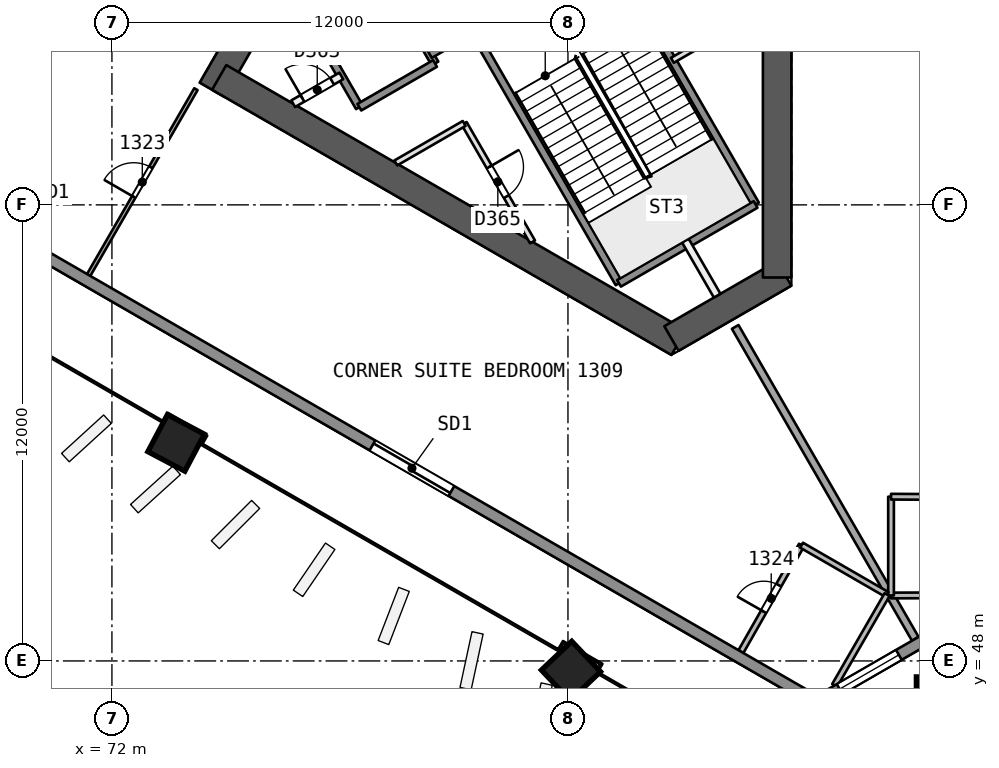
"""IFC4 building model, lengths in metres.
Left out: names, types, materials, properties, quantities, classifications, styles, units other than length and angle.
Written with IfcOpenShell. Run it as: python <this file> out.ifc"""

import sys

from ifc_helpers import new_model, si_unit, direction, frame, frame_2d, origin, origin_2d, place, context, subcontext, project, spatial, rectangle, extrude, element, fill, save


model = new_model("IFC4")
c1 = context("Model", 3, precision=1e-05, world=origin(), true_north=direction((0.0, 1.0)))
c2 = subcontext(c1, "Body", "Model", "MODEL_VIEW")
j1 = project(units=[si_unit("LENGTHUNIT", "METRE"), si_unit("PLANEANGLEUNIT", "RADIAN")], contexts=[c1])
p1 = place(None, origin())
s1 = spatial("IfcSite", under=j1, at=p1, CompositionType="ELEMENT")
p2 = place(p1, origin())
s2 = spatial("IfcBuilding", under=s1, at=p2, CompositionType="ELEMENT")
p3 = place(p2, frame((0.0, 0.0, 61.0)))
s3 = spatial("IfcBuildingStorey", under=s2, at=p3, CompositionType="ELEMENT", Elevation=61.0)
p4 = place(p3, frame((79.717, 71.831, 0.0), z_axis=(0.0, 0.0, 1.0), x_axis=(-0.499996230114, -0.866027580318, 0.0)))
e1 = element("IfcWall", 1, at=p4, inside=s3, PredefinedType="SHEAR", context=c2, shape_type="SweptSolid", body=[
    extrude(rectangle(XDim=10.164, YDim=0.75, at=frame_2d((5.082, 0.0))), origin(), (0.0, 0.0, 1.0), 3.7),
])
p5 = place(p4, frame((0.733, 0.0, 0.0)))
e2 = element("IfcOpeningElement", 2, at=p5, cuts=e1, PredefinedType="OPENING", context=c2, shape_type="SweptSolid", body=[
    extrude(rectangle(XDim=1.2, YDim=2.1, at=frame_2d((0.6, 1.05))), frame((0.0, 0.385, 0.0), z_axis=(0.0, -1.0, 0.0), x_axis=(1.0, 0.0, 0.0)), (0.0, 0.0, 1.0), 0.771),
])
p6 = place(p3, frame((74.822, 63.354, 0.0), z_axis=(0.0, 0.0, 1.0), x_axis=(0.8660248072, -0.500001033313, 0.0)))
e3 = element("IfcWall", 3, at=p6, inside=s3, PredefinedType="SHEAR", context=c2, shape_type="SweptSolid", body=[
    extrude(rectangle(XDim=13.958, YDim=0.75, at=frame_2d((6.979, 0.0))), origin(), (0.0, 0.0, 1.0), 3.7),
])
p7 = place(p3, frame((86.723, 56.483, 0.0), z_axis=(0.0, 0.0, 1.0), x_axis=(0.866017201164, 0.500014207086, 0.0)))
e4 = element("IfcWall", 4, at=p7, inside=s3, PredefinedType="SHEAR", context=c2, shape_type="SweptSolid", body=[
    extrude(rectangle(XDim=3.429, YDim=0.75, at=frame_2d((1.714, 0.0))), origin(), (0.0, 0.0, 1.0), 3.7),
])
p8 = place(p3, frame((89.505, 58.089, 0.0), z_axis=(0.0, 0.0, 1.0), x_axis=(0.0, 1.0, 0.0)))
e5 = element("IfcWall", 5, at=p8, inside=s3, PredefinedType="SHEAR", context=c2, shape_type="SweptSolid", body=[
    extrude(rectangle(XDim=14.117, YDim=0.75, at=frame_2d((7.059, 0.0))), origin(), (0.0, 0.0, 1.0), 3.7),
])
p9 = place(p3, frame((73.688, 53.709, 0.0), z_axis=(0.000857580205, 0.022758859284, 0.9997406158), x_axis=(-0.500033163106, -0.865772080668, 0.020138026985)))
e6 = element("IfcColumn", 6, at=p9, inside=s3, PredefinedType="COLUMN", context=c2, shape_type="SweptSolid", body=[
    extrude(rectangle(XDim=1.1, YDim=1.1, at=origin_2d()), origin(), (0.0, 0.0, 1.0), 3.701),
])
p10 = place(p3, frame((84.089, 47.705, 0.0), z_axis=(-0.008376454378, 0.028163354484, 0.999568237028), x_axis=(-0.500229782748, -0.865657085713, 0.020198376324)))
e7 = element("IfcColumn", 7, at=p10, inside=s3, PredefinedType="COLUMN", context=c2, shape_type="SweptSolid", body=[
    extrude(rectangle(XDim=1.1, YDim=1.1, at=origin_2d()), origin(), (0.0, 0.0, 1.0), 3.702),
])
p11 = place(p3, frame((94.49, 46.243, 0.0), z_axis=(-0.017607037296, 0.030466109479, 0.999380712447), x_axis=(0.500061328599, -0.865274797998, 0.035187946645)))
e8 = element("IfcColumn", 8, at=p11, inside=s3, PredefinedType="COLUMN", context=c2, shape_type="SweptSolid", body=[
    extrude(rectangle(XDim=2.6, YDim=2.6, at=origin_2d()), origin(), (0.0, 0.0, 1.0), 3.702),
])
p12 = place(p3, frame((95.131, 49.73, 0.0), z_axis=(0.0, 0.0, 1.0), x_axis=(-0.999994721507, -0.00324914735, 0.0)))
e9 = element("IfcWall", 9, at=p12, inside=s3, PredefinedType="PARTITIONING", context=c2, shape_type="SweptSolid", body=[
    extrude(rectangle(XDim=2.63, YDim=0.15, at=frame_2d((1.315, 0.0))), origin(), (0.0, 0.0, 1.0), 3.2),
])
p13 = place(p3, frame((92.501, 49.722, 0.0), z_axis=(0.0, 0.0, 1.0), x_axis=(0.0, 1.0, 0.0)))
e10 = element("IfcWall", 10, at=p13, inside=s3, PredefinedType="PARTITIONING", context=c2, shape_type="SweptSolid", body=[
    extrude(rectangle(XDim=2.6, YDim=0.15, at=frame_2d((1.3, 0.0))), origin(), (0.0, 0.0, 1.0), 3.2),
])
p14 = place(p3, frame((92.501, 52.322, 0.0), z_axis=(0.0, 0.0, 1.0), x_axis=(0.999982552355, -0.005907197749, 0.0)))
e11 = element("IfcWall", 11, at=p14, inside=s3, PredefinedType="PARTITIONING", context=c2, shape_type="SweptSolid", body=[
    extrude(rectangle(XDim=3.224, YDim=0.15, at=frame_2d((1.612, 0.0))), origin(), (0.0, 0.0, 1.0), 3.2),
])
p15 = place(p14, frame((1.212, 0.0, 0.0)))
e12 = element("IfcOpeningElement", 12, at=p15, cuts=e11, PredefinedType="OPENING", context=c2, shape_type="SweptSolid", body=[
    extrude(rectangle(XDim=0.8, YDim=2.1, at=frame_2d((0.4, 1.05))), frame((0.0, 0.085, 0.0), z_axis=(0.0, -1.0, 0.0), x_axis=(1.0, 0.0, 0.0)), (0.0, 0.0, 1.0), 0.171),
])
p16 = place(p3, frame((88.401, 56.789, 0.0), z_axis=(0.0, 0.0, 1.0), x_axis=(0.499990030109, -0.866031159827, 0.0)))
e13 = element("IfcWall", 13, at=p16, inside=s3, PredefinedType="PARTITIONING", context=c2, shape_type="SweptSolid", body=[
    extrude(rectangle(XDim=9.478, YDim=0.2, at=frame_2d((4.739, 0.0))), origin(), (0.0, 0.0, 1.0), 3.2),
])
p17 = place(p3, frame((67.337, 60.493, 0.0), z_axis=(0.0, 0.0, 1.0), x_axis=(0.49999337185, 0.866029230515, 0.0)))
e14 = element("IfcWall", 14, at=p17, inside=s3, PredefinedType="PARTITIONING", context=c2, shape_type="SweptSolid", body=[
    extrude(rectangle(XDim=13.625, YDim=0.2, at=frame_2d((6.812, 0.0))), origin(), (0.0, 0.0, 1.0), 3.2),
])
p18 = place(p3, frame((71.387, 58.154, 0.0), z_axis=(0.0, 0.0, 1.0), x_axis=(0.499975725007, 0.866039418504, 0.0)))
e15 = element("IfcWall", 15, at=p18, inside=s3, PredefinedType="PARTITIONING", context=c2, shape_type="SweptSolid", body=[
    extrude(rectangle(XDim=5.646, YDim=0.1, at=frame_2d((2.823, 0.0))), origin(), (0.0, 0.0, 1.0), 3.2),
])
p19 = place(p18, frame((2.373, 0.0, 0.0)))
e16 = element("IfcOpeningElement", 16, at=p19, cuts=e15, PredefinedType="OPENING", context=c2, shape_type="SweptSolid", body=[
    extrude(rectangle(XDim=0.9, YDim=2.1, at=frame_2d((0.45, 1.05))), frame((0.0, 0.061, 0.0), z_axis=(0.0, -1.0, 0.0), x_axis=(1.0, 0.0, 0.0)), (0.0, 0.0, 1.0), 0.121),
])
p20 = place(p3, frame((88.551, 48.245, 0.0), z_axis=(0.0, 0.0, 1.0), x_axis=(0.494849738902, 0.868978558947, 0.0)))
e17 = element("IfcWall", 17, at=p20, inside=s3, PredefinedType="PARTITIONING", context=c2, shape_type="SweptSolid", body=[
    extrude(rectangle(XDim=3.224, YDim=0.15, at=frame_2d((1.612, 0.0))), origin(), (0.0, 0.0, 1.0), 3.2),
])
p21 = place(p20, frame((1.212, 0.0, 0.0)))
e18 = element("IfcOpeningElement", 18, at=p21, cuts=e17, PredefinedType="OPENING", context=c2, shape_type="SweptSolid", body=[
    extrude(rectangle(XDim=0.8, YDim=2.1, at=frame_2d((0.4, 1.05))), frame((0.0, 0.085, 0.0), z_axis=(0.0, -1.0, 0.0), x_axis=(1.0, 0.0, 0.0)), (0.0, 0.0, 1.0), 0.171),
])
p22 = place(p3, frame((90.146, 51.046, 0.0), z_axis=(0.0, 0.0, 1.0), x_axis=(0.866021400173, -0.500006934395, 0.0)))
e19 = element("IfcWall", 19, at=p22, inside=s3, PredefinedType="PARTITIONING", context=c2, shape_type="SweptSolid", body=[
    extrude(rectangle(XDim=2.6, YDim=0.15, at=frame_2d((1.3, 0.0))), origin(), (0.0, 0.0, 1.0), 3.2),
])
p23 = place(p3, frame((92.398, 49.746, 0.0), z_axis=(0.0, 0.0, 1.0), x_axis=(-0.50001084716, -0.866019141083, 0.0)))
e20 = element("IfcWall", 20, at=p23, inside=s3, PredefinedType="PARTITIONING", context=c2, shape_type="SweptSolid", body=[
    extrude(rectangle(XDim=2.76, YDim=0.15, at=frame_2d((1.38, 0.0))), origin(), (0.0, 0.0, 1.0), 3.2),
])
p24 = place(p3, frame((95.874, 49.987, 0.0), z_axis=(0.0, 0.0, 1.0), x_axis=(-0.866013487713, -0.500020638674, 0.0)))
e21 = element("IfcWall", 21, at=p24, inside=s3, PredefinedType="SOLIDWALL", context=c2, shape_type="SweptSolid", body=[
    extrude(rectangle(XDim=6.142, YDim=0.3, at=frame_2d((3.071, 0.0))), origin(), (0.0, 0.0, 1.0), 3.2),
])
p25 = place(p24, frame((0.771, 0.0, 0.9)))
e22 = element("IfcOpeningElement", 22, at=p25, cuts=e21, PredefinedType="OPENING", context=c2, shape_type="SweptSolid", body=[
    extrude(rectangle(XDim=1.8, YDim=1.5, at=frame_2d((0.9, 0.75))), frame((0.0, 0.161, 0.0), z_axis=(0.0, -1.0, 0.0), x_axis=(1.0, 0.0, 0.0)), (0.0, 0.0, 1.0), 0.321),
])
p26 = place(p24, frame((3.656, 0.0, 0.9)))
e23 = element("IfcOpeningElement", 23, at=p26, cuts=e21, PredefinedType="OPENING", context=c2, shape_type="SweptSolid", body=[
    extrude(rectangle(XDim=1.8, YDim=1.5, at=frame_2d((0.9, 0.75))), frame((0.0, 0.161, 0.0), z_axis=(0.0, -1.0, 0.0), x_axis=(1.0, 0.0, 0.0)), (0.0, 0.0, 1.0), 0.321),
])
p27 = place(p3, frame((90.555, 46.916, 0.0), z_axis=(0.0, 0.0, 1.0), x_axis=(-0.866024926003, 0.500000827541, 0.0)))
e24 = element("IfcWall", 24, at=p27, inside=s3, PredefinedType="SOLIDWALL", context=c2, shape_type="SweptSolid", body=[
    extrude(rectangle(XDim=60.025, YDim=0.3, at=frame_2d((30.013, 0.0))), origin(), (0.0, 0.0, 1.0), 3.2),
])
p28 = place(p27, frame((28.813, 0.0, 0.0)))
e25 = element("IfcOpeningElement", 25, at=p28, cuts=e24, PredefinedType="OPENING", context=c2, shape_type="SweptSolid", body=[
    extrude(rectangle(XDim=2.4, YDim=2.4, at=frame_2d((1.2, 1.2))), frame((0.0, 0.161, 0.0), z_axis=(0.0, -1.0, 0.0), x_axis=(1.0, 0.0, 0.0)), (0.0, 0.0, 1.0), 0.321),
])
p29 = place(p27, frame((34.269, 0.0, 0.0)))
e26 = element("IfcOpeningElement", 26, at=p29, cuts=e24, PredefinedType="OPENING", context=c2, shape_type="SweptSolid", body=[
    extrude(rectangle(XDim=2.4, YDim=2.4, at=frame_2d((1.2, 1.2))), frame((0.0, 0.161, 0.0), z_axis=(0.0, -1.0, 0.0), x_axis=(1.0, 0.0, 0.0)), (0.0, 0.0, 1.0), 0.321),
])
p30 = place(p27, frame((46.558, 0.0, 0.0)))
e27 = element("IfcOpeningElement", 27, at=p30, cuts=e24, PredefinedType="OPENING", context=c2, shape_type="SweptSolid", body=[
    extrude(rectangle(XDim=2.4, YDim=2.4, at=frame_2d((1.2, 1.2))), frame((0.0, 0.161, 0.0), z_axis=(0.0, -1.0, 0.0), x_axis=(1.0, 0.0, 0.0)), (0.0, 0.0, 1.0), 0.321),
])
p31 = place(p27, frame((23.357, 0.0, 0.0)))
e28 = element("IfcOpeningElement", 28, at=p31, cuts=e24, PredefinedType="OPENING", context=c2, shape_type="SweptSolid", body=[
    extrude(rectangle(XDim=2.4, YDim=2.4, at=frame_2d((1.2, 1.2))), frame((0.0, 0.161, 0.0), z_axis=(0.0, -1.0, 0.0), x_axis=(1.0, 0.0, 0.0)), (0.0, 0.0, 1.0), 0.321),
])
p32 = place(p27, frame((11.109, 0.0, 0.0)))
e29 = element("IfcOpeningElement", 29, at=p32, cuts=e24, PredefinedType="OPENING", context=c2, shape_type="SweptSolid", body=[
    extrude(rectangle(XDim=2.4, YDim=2.4, at=frame_2d((1.2, 1.2))), frame((0.0, 0.161, 0.0), z_axis=(0.0, -1.0, 0.0), x_axis=(1.0, 0.0, 0.0)), (0.0, 0.0, 1.0), 0.321),
])
p33 = place(p3, frame((77.135, 64.952, 0.0), z_axis=(0.0, 0.0, 1.0), x_axis=(0.499996545922, -0.866027397988, 0.0)))
e30 = element("IfcWall", 30, at=p33, inside=s3, PredefinedType="SOLIDWALL", context=c2, shape_type="SweptSolid", body=[
    extrude(rectangle(XDim=2.75, YDim=0.2, at=frame_2d((1.375, 0.0))), origin(), (0.0, 0.0, 1.0), 3.2),
])
p34 = place(p3, frame((81.269, 62.142, 0.0), z_axis=(0.0, 0.0, 1.0), x_axis=(0.500043557135, -0.866000254601, 0.0)))
e31 = element("IfcWall", 31, at=p34, inside=s3, PredefinedType="PARTITIONING", context=c2, shape_type="SweptSolid", body=[
    extrude(rectangle(XDim=3.598, YDim=0.15, at=frame_2d((1.799, 0.0))), origin(), (0.0, 0.0, 1.0), 3.2),
])
p35 = place(p34, frame((1.322, 0.0, 0.0)))
e32 = element("IfcOpeningElement", 32, at=p35, cuts=e31, PredefinedType="OPENING", context=c2, shape_type="SweptSolid", body=[
    extrude(rectangle(XDim=0.9, YDim=2.1, at=frame_2d((0.45, 1.05))), frame((0.0, 0.085, 0.0), z_axis=(0.0, -1.0, 0.0), x_axis=(1.0, 0.0, 0.0)), (0.0, 0.0, 1.0), 0.171),
])
p36 = place(p3, frame((79.127, 66.102, 0.0), z_axis=(0.0, 0.0, 1.0), x_axis=(0.499996545922, -0.866027397988, 0.0)))
e33 = element("IfcWall", 33, at=p36, inside=s3, PredefinedType="SOLIDWALL", context=c2, shape_type="SweptSolid", body=[
    extrude(rectangle(XDim=2.75, YDim=0.2, at=frame_2d((1.375, 0.0))), origin(), (0.0, 0.0, 1.0), 3.2),
])
p37 = place(p3, frame((81.493, 64.604, 0.0), z_axis=(0.0, 0.0, 1.0), x_axis=(0.500006057782, -0.866021906294, 0.0)))
e34 = element("IfcWall", 34, at=p37, inside=s3, PredefinedType="SOLIDWALL", context=c2, shape_type="SweptSolid", body=[
    extrude(rectangle(XDim=7.7, YDim=0.2, at=frame_2d((3.85, 0.0))), origin(), (0.0, 0.0, 1.0), 3.2),
])
p38 = place(p3, frame((87.09, 59.06, 0.0), z_axis=(0.0, 0.0, 1.0), x_axis=(0.499937194881, -0.866061661301, 0.0)))
e35 = element("IfcWall", 35, at=p38, inside=s3, PredefinedType="PARTITIONING", context=c2, shape_type="SweptSolid", body=[
    extrude(rectangle(XDim=1.673, YDim=0.2, at=frame_2d((0.836, 0.0))), origin(), (0.0, 0.0, 1.0), 3.2),
])
p39 = place(p3, frame((85.087, 66.679, 0.0), z_axis=(0.0, 0.0, 1.0), x_axis=(0.500019787375, -0.866013979237, 0.0)))
e36 = element("IfcWall", 36, at=p39, inside=s3, PredefinedType="SOLIDWALL", context=c2, shape_type="SweptSolid", body=[
    extrude(rectangle(XDim=7.7, YDim=0.2, at=frame_2d((3.85, 0.0))), origin(), (0.0, 0.0, 1.0), 3.2),
])
p40 = place(p39, frame((0.55, 0.0, 0.0)))
e37 = element("IfcOpeningElement", 37, at=p40, cuts=e36, PredefinedType="OPENING", context=c2, shape_type="SweptSolid", body=[
    extrude(rectangle(XDim=1.1, YDim=2.1, at=frame_2d((0.55, 1.05))), frame((0.0, 0.11, 0.0), z_axis=(0.0, -1.0, 0.0), x_axis=(1.0, 0.0, 0.0)), (0.0, 0.0, 1.0), 0.221),
])
p41 = place(p3, frame((76.77, 62.662, 0.0), z_axis=(0.0, 0.0, 1.0), x_axis=(0.866054810376, 0.49994906283, 0.0)))
e38 = element("IfcWall", 38, at=p41, inside=s3, PredefinedType="PARTITIONING", context=c2, shape_type="SweptSolid", body=[
    extrude(rectangle(XDim=1.461, YDim=0.2, at=frame_2d((0.73, 0.0))), origin(), (0.0, 0.0, 1.0), 3.2),
])
p42 = place(p41, frame((0.281, 0.0, 0.0)))
e39 = element("IfcOpeningElement", 39, at=p42, cuts=e38, PredefinedType="OPENING", context=c2, shape_type="SweptSolid", body=[
    extrude(rectangle(XDim=0.9, YDim=2.1, at=frame_2d((0.45, 1.05))), frame((0.0, 0.11, 0.0), z_axis=(0.0, -1.0, 0.0), x_axis=(1.0, 0.0, 0.0)), (0.0, 0.0, 1.0), 0.221),
])
p43 = place(p3, frame((80.367, 63.954, 0.0), z_axis=(0.0, 0.0, 1.0), x_axis=(0.866026575979, 0.499997969693, 0.0)))
e40 = element("IfcWall", 40, at=p43, inside=s3, PredefinedType="SOLIDWALL", context=c2, shape_type="SweptSolid", body=[
    extrude(rectangle(XDim=6.75, YDim=0.2, at=frame_2d((3.375, 0.0))), origin(), (0.0, 0.0, 1.0), 3.2),
])
p44 = place(p3, frame((78.51, 62.57, 0.0), z_axis=(0.0, 0.0, 1.0), x_axis=(0.866053019151, 0.499952165731, 0.0)))
e41 = element("IfcWall", 41, at=p44, inside=s3, PredefinedType="SOLIDWALL", context=c2, shape_type="SweptSolid", body=[
    extrude(rectangle(XDim=2.3, YDim=0.2, at=frame_2d((1.15, 0.0))), origin(), (0.0, 0.0, 1.0), 3.2),
])
p45 = place(p3, frame((79.47, 61.103, 0.0), z_axis=(0.0, 0.0, 1.0), x_axis=(0.866021168401, 0.500007335828, 0.0)))
e42 = element("IfcWall", 42, at=p45, inside=s3, PredefinedType="PARTITIONING", context=c2, shape_type="SweptSolid", body=[
    extrude(rectangle(XDim=2.077, YDim=0.15, at=frame_2d((1.039, 0.0))), origin(), (0.0, 0.0, 1.0), 3.2),
])
p46 = place(p3, frame((86.747, 63.804, 0.0), z_axis=(0.0, 0.0, 1.0), x_axis=(0.866023045711, 0.500004084281, 0.0)))
e43 = element("IfcWall", 43, at=p46, inside=s3, PredefinedType="PARTITIONING", context=c2, shape_type="SweptSolid", body=[
    extrude(rectangle(XDim=2.751, YDim=0.15, at=frame_2d((1.376, 0.0))), origin(), (0.0, 0.0, 1.0), 3.2),
])
p47 = place(p46, frame((0.926, 0.0, 0.0)))
e44 = element("IfcOpeningElement", 44, at=p47, cuts=e43, PredefinedType="OPENING", context=c2, shape_type="SweptSolid", body=[
    extrude(rectangle(XDim=0.9, YDim=2.1, at=frame_2d((0.45, 1.05))), frame((0.0, 0.085, 0.0), z_axis=(0.0, -1.0, 0.0), x_axis=(1.0, 0.0, 0.0)), (0.0, 0.0, 1.0), 0.171),
])
p48 = place(p3, frame((85.343, 57.935, 0.0), z_axis=(0.0, 0.0, 1.0), x_axis=(0.866004344652, 0.500036473714, 0.0)))
e45 = element("IfcWall", 45, at=p48, inside=s3, PredefinedType="SOLIDWALL", context=c2, shape_type="SweptSolid", body=[
    extrude(rectangle(XDim=4.15, YDim=0.2, at=frame_2d((2.075, 0.0))), origin(), (0.0, 0.0, 1.0), 3.2),
])
p49 = place(p19, origin())
e46 = element("IfcDoor", 46, at=p49, inside=s3, OperationType="SINGLE_SWING_LEFT", PredefinedType="NOTDEFINED", context=c2, shape_type="SweptSolid", body=[
    extrude(rectangle(XDim=0.9, YDim=2.1, at=frame_2d((0.45, 1.05))), frame((0.0, 0.025, 0.0), z_axis=(0.0, -1.0, 0.0), x_axis=(1.0, 0.0, 0.0)), (0.0, 0.0, 1.0), 0.05),
])
fill(e16, e46)
p50 = place(p21, origin())
e47 = element("IfcDoor", 47, at=p50, inside=s3, OperationType="SINGLE_SWING_LEFT", PredefinedType="NOTDEFINED", context=c2, shape_type="SweptSolid", body=[
    extrude(rectangle(XDim=0.8, YDim=2.1, at=frame_2d((0.4, 1.05))), frame((0.0, 0.025, 0.0), z_axis=(0.0, -1.0, 0.0), x_axis=(1.0, 0.0, 0.0)), (0.0, 0.0, 1.0), 0.05),
])
fill(e18, e47)
p51 = place(p26, origin())
e48 = element("IfcWindow", 48, at=p51, inside=s3, PartitioningType="SINGLE_PANEL", PredefinedType="WINDOW", context=c2, shape_type="SweptSolid", body=[
    extrude(rectangle(XDim=1.8, YDim=1.5, at=frame_2d((0.9, 0.75))), frame((0.0, 0.03, 0.0), z_axis=(0.0, -1.0, 0.0), x_axis=(1.0, 0.0, 0.0)), (0.0, 0.0, 1.0), 0.06),
])
fill(e23, e48)
p52 = place(p32, origin())
e49 = element("IfcDoor", 49, at=p52, inside=s3, OperationType="SLIDING_TO_LEFT", PredefinedType="NOTDEFINED", context=c2, shape_type="SweptSolid", body=[
    extrude(rectangle(XDim=2.4, YDim=2.4, at=frame_2d((1.2, 1.2))), frame((0.0, 0.025, 0.0), z_axis=(0.0, -1.0, 0.0), x_axis=(1.0, 0.0, 0.0)), (0.0, 0.0, 1.0), 0.05),
])
fill(e29, e49)
p53 = place(p42, origin())
e50 = element("IfcDoor", 50, at=p53, inside=s3, OperationType="SINGLE_SWING_LEFT", PredefinedType="NOTDEFINED", context=c2, shape_type="SweptSolid", body=[
    extrude(rectangle(XDim=0.9, YDim=2.1, at=frame_2d((0.45, 1.05))), frame((0.0, 0.025, 0.0), z_axis=(0.0, -1.0, 0.0), x_axis=(1.0, 0.0, 0.0)), (0.0, 0.0, 1.0), 0.05),
])
fill(e39, e50)
p54 = place(p35, origin())
e51 = element("IfcDoor", 51, at=p54, inside=s3, OperationType="SINGLE_SWING_LEFT", PredefinedType="NOTDEFINED", context=c2, shape_type="SweptSolid", body=[
    extrude(rectangle(XDim=0.9, YDim=2.1, at=frame_2d((0.45, 1.05))), frame((0.0, 0.025, 0.0), z_axis=(0.0, -1.0, 0.0), x_axis=(1.0, 0.0, 0.0)), (0.0, 0.0, 1.0), 0.05),
])
fill(e32, e51)
save(model, sys.argv[1])
